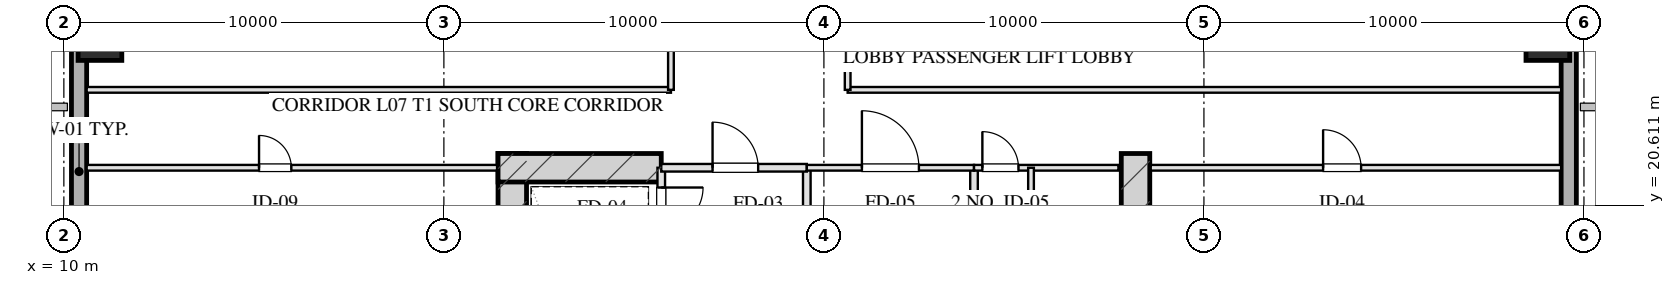
"""IFC4 building model, lengths in metres.
Left out: names, types, materials, properties, quantities, classifications, styles, units other than length and angle.
Written with IfcOpenShell. Run it as: python <this file> out.ifc"""

import sys

from ifc_helpers import new_model, si_unit, direction, frame, frame_2d, origin, origin_2d, place, context, subcontext, project, spatial, rectangle, hollow_rectangle, extrude, element, fill, save


model = new_model("IFC4")
c1 = context("Model", 3, precision=1e-05, world=origin(), true_north=direction((0.0, 1.0)))
c2 = subcontext(c1, "Body", "Model", "MODEL_VIEW")
j1 = project(units=[si_unit("LENGTHUNIT", "METRE"), si_unit("PLANEANGLEUNIT", "RADIAN")], contexts=[c1])
p1 = place(None, origin())
s1 = spatial("IfcSite", under=j1, at=p1, CompositionType="ELEMENT")
p2 = place(p1, origin())
s2 = spatial("IfcBuilding", under=s1, at=p2, CompositionType="ELEMENT")
p3 = place(p2, frame((0.0, 0.0, 34.0)))
s3 = spatial("IfcBuildingStorey", under=s2, at=p3, CompositionType="ELEMENT", Elevation=34.0)
for number, where, z_axis, x_axis in (
    (1, (21.8, 21.975, 0.0), (0.0, 0.0, 1.0), (0.0, -1.0, 0.0)),
    (2, (38.2, 21.975, 0.0), (0.0, 0.0, 1.0), (0.0, -1.0, 0.0)),
):
    element("IfcWall", number, at=place(p3, frame(where, z_axis=z_axis, x_axis=x_axis)), inside=s3, PredefinedType="SHEAR", context=c2, shape_type="SweptSolid", body=[
        extrude(rectangle(XDim=9.63, YDim=0.75, at=frame_2d((4.815, 0.0))), origin(), (0.0, 0.0, 1.0), 4.0),
    ])
p4 = place(p3, frame((21.425, 21.6, 0.0), z_axis=(0.0, 0.0, 1.0), x_axis=(1.0, 0.0, 0.0)))
e3 = element("IfcWall", 3, at=p4, inside=s3, PredefinedType="SHEAR", context=c2, shape_type="SweptSolid", body=[
    extrude(rectangle(XDim=4.295, YDim=0.75, at=frame_2d((2.147, 0.0))), origin(), (0.0, 0.0, 1.0), 4.0),
])
for number, where, z_axis, x_axis in (
    (4, (10.95, 25.0, 0.0), (0.0, 0.0, 1.0), (1.0, 0.0, 0.0)),
    (5, (49.05, 25.0, 0.0), (0.0, 0.0, 1.0), (1.0, 0.0, 0.0)),
):
    element("IfcColumn", number, at=place(p3, frame(where, z_axis=z_axis, x_axis=x_axis)), inside=s3, PredefinedType="COLUMN", context=c2, shape_type="SweptSolid", body=[
        extrude(hollow_rectangle(XDim=1.15, YDim=1.15, WallThickness=0.04, at=origin_2d()), origin(), (0.0, 0.0, 1.0), 4.001),
    ])
p5 = place(p3, frame((10.4, 7.2, 0.0), z_axis=(0.0, 0.0, 1.0), x_axis=(0.0, 1.0, 0.0)))
e6 = element("IfcWall", 6, at=p5, inside=s3, PredefinedType="SOLIDWALL", context=c2, shape_type="SweptSolid", body=[
    extrude(rectangle(XDim=53.6, YDim=0.4, at=frame_2d((26.8, 0.0))), origin(), (0.0, 0.0, 1.0), 3.16),
])
p6 = place(p5, frame((22.95, 0.0, 0.75)))
e7 = element("IfcOpeningElement", 7, at=p6, cuts=e6, PredefinedType="OPENING", context=c2, shape_type="SweptSolid", body=[
    extrude(rectangle(XDim=2.5, YDim=1.75, at=frame_2d((1.25, 0.875))), frame((0.0, 0.21, 0.0), z_axis=(0.0, -1.0, 0.0), x_axis=(1.0, 0.0, 0.0)), (0.0, 0.0, 1.0), 0.42),
])
p7 = place(p5, frame((29.35, 0.0, 0.0)))
e8 = element("IfcOpeningElement", 8, at=p7, cuts=e6, PredefinedType="OPENING", context=c2, shape_type="SweptSolid", body=[
    extrude(rectangle(XDim=1.1, YDim=2.15, at=frame_2d((0.55, 1.075))), frame((0.0, 0.21, 0.0), z_axis=(0.0, -1.0, 0.0), x_axis=(1.0, 0.0, 0.0)), (0.0, 0.0, 1.0), 0.42),
])
p8 = place(p3, frame((49.6, 60.8, 0.0), z_axis=(0.0, 0.0, 1.0), x_axis=(0.0, -1.0, 0.0)))
e9 = element("IfcWall", 9, at=p8, inside=s3, PredefinedType="SOLIDWALL", context=c2, shape_type="SweptSolid", body=[
    extrude(rectangle(XDim=53.6, YDim=0.4, at=frame_2d((26.8, 0.0))), origin(), (0.0, 0.0, 1.0), 3.16),
])
p9 = place(p8, frame((28.15, 0.0, 0.75)))
e10 = element("IfcOpeningElement", 10, at=p9, cuts=e9, PredefinedType="OPENING", context=c2, shape_type="SweptSolid", body=[
    extrude(rectangle(XDim=2.5, YDim=1.75, at=frame_2d((1.25, 0.875))), frame((0.0, 0.21, 0.0), z_axis=(0.0, -1.0, 0.0), x_axis=(1.0, 0.0, 0.0)), (0.0, 0.0, 1.0), 0.42),
])
p10 = place(p8, frame((23.15, 0.0, 0.0)))
e11 = element("IfcOpeningElement", 11, at=p10, cuts=e9, PredefinedType="OPENING", context=c2, shape_type="SweptSolid", body=[
    extrude(rectangle(XDim=1.1, YDim=2.15, at=frame_2d((0.55, 1.075))), frame((0.0, 0.21, 0.0), z_axis=(0.0, -1.0, 0.0), x_axis=(1.0, 0.0, 0.0)), (0.0, 0.0, 1.0), 0.42),
])
p11 = place(p3, frame((25.72, 21.6, 0.0), z_axis=(0.0, 0.0, 1.0), x_axis=(0.0, -1.0, 0.0)))
e12 = element("IfcWall", 12, at=p11, inside=s3, PredefinedType="PARTITIONING", context=c2, shape_type="SweptSolid", body=[
    extrude(rectangle(XDim=1.9, YDim=0.2, at=frame_2d((0.95, 0.0))), origin(), (0.0, 0.0, 1.0), 3.725),
])
p12 = place(p11, frame((0.52, 0.0, 0.0)))
e13 = element("IfcOpeningElement", 13, at=p12, cuts=e12, PredefinedType="OPENING", context=c2, shape_type="SweptSolid", body=[
    extrude(rectangle(XDim=1.1, YDim=2.05, at=frame_2d((0.55, 1.025))), frame((0.0, 0.11, 0.0), z_axis=(0.0, -1.0, 0.0), x_axis=(1.0, 0.0, 0.0)), (0.0, 0.0, 1.0), 0.22),
])
p13 = place(p3, frame((29.55, 21.6, 0.0), z_axis=(0.0, 0.0, 1.0), x_axis=(0.0, -1.0, 0.0)))
e14 = element("IfcWall", 14, at=p13, inside=s3, PredefinedType="PARTITIONING", context=c2, shape_type="SweptSolid", body=[
    extrude(rectangle(XDim=8.43, YDim=0.2, at=frame_2d((4.215, 0.0))), origin(), (0.0, 0.0, 1.0), 3.725),
])
p14 = place(p3, frame((25.72, 21.6, 0.0), z_axis=(0.0, 0.0, 1.0), x_axis=(1.0, 0.0, 0.0)))
e15 = element("IfcWall", 15, at=p14, inside=s3, PredefinedType="PARTITIONING", context=c2, shape_type="SweptSolid", body=[
    extrude(rectangle(XDim=3.83, YDim=0.2, at=frame_2d((1.915, 0.0))), origin(), (0.0, 0.0, 1.0), 3.725),
])
p15 = place(p14, frame((1.35, 0.0, 0.0)))
e16 = element("IfcOpeningElement", 16, at=p15, cuts=e15, PredefinedType="OPENING", context=c2, shape_type="SweptSolid", body=[
    extrude(rectangle(XDim=1.2, YDim=2.05, at=frame_2d((0.6, 1.025))), frame((0.0, 0.11, 0.0), z_axis=(0.0, -1.0, 0.0), x_axis=(1.0, 0.0, 0.0)), (0.0, 0.0, 1.0), 0.22),
])
p16 = place(p3, frame((33.95, 21.6, 0.0), z_axis=(0.0, 0.0, 1.0), x_axis=(0.0, -1.0, 0.0)))
e17 = element("IfcWall", 17, at=p16, inside=s3, PredefinedType="PARTITIONING", context=c2, shape_type="SweptSolid", body=[
    extrude(rectangle(XDim=8.43, YDim=0.2, at=frame_2d((4.215, 0.0))), origin(), (0.0, 0.0, 1.0), 3.725),
])
p17 = place(p3, frame((29.55, 21.6, 0.0), z_axis=(0.0, 0.0, 1.0), x_axis=(1.0, 0.0, 0.0)))
e18 = element("IfcWall", 18, at=p17, inside=s3, PredefinedType="PARTITIONING", context=c2, shape_type="SweptSolid", body=[
    extrude(rectangle(XDim=4.4, YDim=0.15, at=frame_2d((2.2, 0.0))), origin(), (0.0, 0.0, 1.0), 3.725),
])
p18 = place(p17, frame((1.45, 0.0, 0.0)))
e19 = element("IfcOpeningElement", 19, at=p18, cuts=e18, PredefinedType="OPENING", context=c2, shape_type="SweptSolid", body=[
    extrude(rectangle(XDim=1.5, YDim=2.05, at=frame_2d((0.75, 1.025))), frame((0.0, 0.085, 0.0), z_axis=(0.0, -1.0, 0.0), x_axis=(1.0, 0.0, 0.0)), (0.0, 0.0, 1.0), 0.17),
])
p19 = place(p3, frame((33.95, 21.6, 0.0), z_axis=(0.0, 0.0, 1.0), x_axis=(1.0, 0.0, 0.0)))
e20 = element("IfcWall", 20, at=p19, inside=s3, PredefinedType="PARTITIONING", context=c2, shape_type="SweptSolid", body=[
    extrude(rectangle(XDim=3.8, YDim=0.15, at=frame_2d((1.9, 0.0))), origin(), (0.0, 0.0, 1.0), 3.725),
])
p20 = place(p19, frame((0.22, 0.0, 0.0)))
e21 = element("IfcOpeningElement", 21, at=p20, cuts=e20, PredefinedType="OPENING", context=c2, shape_type="SweptSolid", body=[
    extrude(rectangle(XDim=0.95, YDim=2.05, at=frame_2d((0.475, 1.025))), frame((0.0, 0.085, 0.0), z_axis=(0.0, -1.0, 0.0), x_axis=(1.0, 0.0, 0.0)), (0.0, 0.0, 1.0), 0.17),
])
p21 = place(p3, frame((35.45, 21.6, 0.0), z_axis=(0.0, 0.0, 1.0), x_axis=(0.0, -1.0, 0.0)))
e22 = element("IfcWall", 22, at=p21, inside=s3, PredefinedType="PARTITIONING", context=c2, shape_type="SweptSolid", body=[
    extrude(rectangle(XDim=8.43, YDim=0.15, at=frame_2d((4.215, 0.0))), origin(), (0.0, 0.0, 1.0), 3.365),
])
p22 = place(p21, frame((2.55, 0.0, 0.0)))
e23 = element("IfcOpeningElement", 23, at=p22, cuts=e22, PredefinedType="OPENING", context=c2, shape_type="SweptSolid", body=[
    extrude(rectangle(XDim=0.95, YDim=2.05, at=frame_2d((0.475, 1.025))), frame((0.0, 0.085, 0.0), z_axis=(0.0, -1.0, 0.0), x_axis=(1.0, 0.0, 0.0)), (0.0, 0.0, 1.0), 0.17),
])
p23 = place(p21, frame((4.7, 0.0, 0.0)))
e24 = element("IfcOpeningElement", 24, at=p23, cuts=e22, PredefinedType="OPENING", context=c2, shape_type="SweptSolid", body=[
    extrude(rectangle(XDim=0.9, YDim=2.05, at=frame_2d((0.45, 1.025))), frame((0.0, 0.085, 0.0), z_axis=(0.0, -1.0, 0.0), x_axis=(1.0, 0.0, 0.0)), (0.0, 0.0, 1.0), 0.17),
])
p24 = place(p21, frame((6.8, 0.0, 0.0)))
e25 = element("IfcOpeningElement", 25, at=p24, cuts=e22, PredefinedType="OPENING", context=c2, shape_type="SweptSolid", body=[
    extrude(rectangle(XDim=0.9, YDim=2.05, at=frame_2d((0.45, 1.025))), frame((0.0, 0.085, 0.0), z_axis=(0.0, -1.0, 0.0), x_axis=(1.0, 0.0, 0.0)), (0.0, 0.0, 1.0), 0.17),
])
p25 = place(p3, frame((10.6, 21.6, 0.0), z_axis=(0.0, 0.0, 1.0), x_axis=(1.0, 0.0, 0.0)))
e26 = element("IfcWall", 26, at=p25, inside=s3, PredefinedType="PARTITIONING", context=c2, shape_type="SweptSolid", body=[
    extrude(rectangle(XDim=10.8, YDim=0.15, at=frame_2d((5.4, 0.0))), origin(), (0.0, 0.0, 1.0), 3.725),
])
p26 = place(p25, frame((4.536, 0.0, 0.0)))
e27 = element("IfcOpeningElement", 27, at=p26, cuts=e26, PredefinedType="OPENING", context=c2, shape_type="SweptSolid", body=[
    extrude(rectangle(XDim=0.85, YDim=2.05, at=frame_2d((0.425, 1.025))), frame((0.0, 0.085, 0.0), z_axis=(0.0, -1.0, 0.0), x_axis=(1.0, 0.0, 0.0)), (0.0, 0.0, 1.0), 0.17),
])
p27 = place(p3, frame((38.6, 21.6, 0.0), z_axis=(0.0, 0.0, 1.0), x_axis=(1.0, 0.0, 0.0)))
e28 = element("IfcWall", 28, at=p27, inside=s3, PredefinedType="PARTITIONING", context=c2, shape_type="SweptSolid", body=[
    extrude(rectangle(XDim=10.8, YDim=0.15, at=frame_2d((5.4, 0.0))), origin(), (0.0, 0.0, 1.0), 3.725),
])
p28 = place(p27, frame((4.536, 0.0, 0.0)))
e29 = element("IfcOpeningElement", 29, at=p28, cuts=e28, PredefinedType="OPENING", context=c2, shape_type="SweptSolid", body=[
    extrude(rectangle(XDim=1.0, YDim=2.05, at=frame_2d((0.5, 1.025))), frame((0.0, 0.085, 0.0), z_axis=(0.0, -1.0, 0.0), x_axis=(1.0, 0.0, 0.0)), (0.0, 0.0, 1.0), 0.17),
])
p29 = place(p3, frame((10.6, 23.65, 0.0), z_axis=(0.0, 0.0, 1.0), x_axis=(1.0, 0.0, 0.0)))
e30 = element("IfcWall", 30, at=p29, inside=s3, PredefinedType="PARTITIONING", context=c2, shape_type="SweptSolid", body=[
    extrude(rectangle(XDim=15.375, YDim=0.15, at=frame_2d((7.688, 0.0))), origin(), (0.0, 0.0, 1.0), 3.725),
])
p30 = place(p3, frame((30.625, 23.65, 0.0), z_axis=(0.0, 0.0, 1.0), x_axis=(1.0, 0.0, 0.0)))
e31 = element("IfcWall", 31, at=p30, inside=s3, PredefinedType="PARTITIONING", context=c2, shape_type="SweptSolid", body=[
    extrude(rectangle(XDim=18.775, YDim=0.15, at=frame_2d((9.387, 0.0))), origin(), (0.0, 0.0, 1.0), 3.725),
])
p31 = place(p3, frame((25.975, 23.65, 0.0), z_axis=(0.0, 0.0, 1.0), x_axis=(0.0, 1.0, 0.0)))
e32 = element("IfcWall", 32, at=p31, inside=s3, PredefinedType="PARTITIONING", context=c2, shape_type="SweptSolid", body=[
    extrude(rectangle(XDim=20.7, YDim=0.15, at=frame_2d((10.35, 0.0))), origin(), (0.0, 0.0, 1.0), 3.725),
])
p32 = place(p31, frame((2.175, 0.0, 0.0)))
e33 = element("IfcOpeningElement", 33, at=p32, cuts=e32, PredefinedType="OPENING", context=c2, shape_type="SweptSolid", body=[
    extrude(rectangle(XDim=1.0, YDim=2.05, at=frame_2d((0.5, 1.025))), frame((0.0, 0.085, 0.0), z_axis=(0.0, -1.0, 0.0), x_axis=(1.0, 0.0, 0.0)), (0.0, 0.0, 1.0), 0.17),
])
p33 = place(p31, frame((7.69, 0.0, 0.0)))
e34 = element("IfcOpeningElement", 34, at=p33, cuts=e32, PredefinedType="OPENING", context=c2, shape_type="SweptSolid", body=[
    extrude(rectangle(XDim=1.05, YDim=2.05, at=frame_2d((0.525, 1.025))), frame((0.0, 0.085, 0.0), z_axis=(0.0, -1.0, 0.0), x_axis=(1.0, 0.0, 0.0)), (0.0, 0.0, 1.0), 0.17),
])
p34 = place(p31, frame((12.69, 0.0, 0.0)))
e35 = element("IfcOpeningElement", 35, at=p34, cuts=e32, PredefinedType="OPENING", context=c2, shape_type="SweptSolid", body=[
    extrude(rectangle(XDim=1.0, YDim=2.05, at=frame_2d((0.5, 1.025))), frame((0.0, 0.085, 0.0), z_axis=(0.0, -1.0, 0.0), x_axis=(1.0, 0.0, 0.0)), (0.0, 0.0, 1.0), 0.17),
])
p35 = place(p31, frame((17.525, 0.0, 0.0)))
e36 = element("IfcOpeningElement", 36, at=p35, cuts=e32, PredefinedType="OPENING", context=c2, shape_type="SweptSolid", body=[
    extrude(rectangle(XDim=1.0, YDim=2.05, at=frame_2d((0.5, 1.025))), frame((0.0, 0.085, 0.0), z_axis=(0.0, -1.0, 0.0), x_axis=(1.0, 0.0, 0.0)), (0.0, 0.0, 1.0), 0.17),
])
p36 = place(p3, frame((30.625, 23.65, 0.0), z_axis=(0.0, 0.0, 1.0), x_axis=(0.0, 1.0, 0.0)))
e37 = element("IfcWall", 37, at=p36, inside=s3, PredefinedType="PARTITIONING", context=c2, shape_type="SweptSolid", body=[
    extrude(rectangle(XDim=20.7, YDim=0.15, at=frame_2d((10.35, 0.0))), origin(), (0.0, 0.0, 1.0), 3.725),
])
p37 = place(p36, frame((2.191, 0.0, 0.0)))
e38 = element("IfcOpeningElement", 38, at=p37, cuts=e37, PredefinedType="OPENING", context=c2, shape_type="SweptSolid", body=[
    extrude(rectangle(XDim=1.0, YDim=2.05, at=frame_2d((0.5, 1.025))), frame((0.0, 0.085, 0.0), z_axis=(0.0, -1.0, 0.0), x_axis=(1.0, 0.0, 0.0)), (0.0, 0.0, 1.0), 0.17),
])
p38 = place(p36, frame((7.78, 0.0, 0.0)))
e39 = element("IfcOpeningElement", 39, at=p38, cuts=e37, PredefinedType="OPENING", context=c2, shape_type="SweptSolid", body=[
    extrude(rectangle(XDim=1.0, YDim=2.05, at=frame_2d((0.5, 1.025))), frame((0.0, 0.085, 0.0), z_axis=(0.0, -1.0, 0.0), x_axis=(1.0, 0.0, 0.0)), (0.0, 0.0, 1.0), 0.17),
])
p39 = place(p36, frame((12.764, 0.0, 0.0)))
e40 = element("IfcOpeningElement", 40, at=p39, cuts=e37, PredefinedType="OPENING", context=c2, shape_type="SweptSolid", body=[
    extrude(rectangle(XDim=1.0, YDim=2.05, at=frame_2d((0.5, 1.025))), frame((0.0, 0.085, 0.0), z_axis=(0.0, -1.0, 0.0), x_axis=(1.0, 0.0, 0.0)), (0.0, 0.0, 1.0), 0.17),
])
p40 = place(p36, frame((17.525, 0.0, 0.0)))
e41 = element("IfcOpeningElement", 41, at=p40, cuts=e37, PredefinedType="OPENING", context=c2, shape_type="SweptSolid", body=[
    extrude(rectangle(XDim=0.85, YDim=2.05, at=frame_2d((0.425, 1.025))), frame((0.0, 0.085, 0.0), z_axis=(0.0, -1.0, 0.0), x_axis=(1.0, 0.0, 0.0)), (0.0, 0.0, 1.0), 0.17),
])
p41 = place(p12, origin())
e42 = element("IfcDoor", 42, at=p41, inside=s3, OperationType="SINGLE_SWING_LEFT", PredefinedType="DOOR", context=c2, shape_type="SweptSolid", body=[
    extrude(rectangle(XDim=1.1, YDim=2.05, at=frame_2d((0.55, 1.025))), frame((0.0, 0.025, 0.0), z_axis=(0.0, -1.0, 0.0), x_axis=(1.0, 0.0, 0.0)), (0.0, 0.0, 1.0), 0.05),
])
fill(e13, e42)
p42 = place(p15, origin())
e43 = element("IfcDoor", 43, at=p42, inside=s3, OperationType="SINGLE_SWING_LEFT", PredefinedType="DOOR", context=c2, shape_type="SweptSolid", body=[
    extrude(rectangle(XDim=1.2, YDim=2.05, at=frame_2d((0.6, 1.025))), frame((0.0, 0.025, 0.0), z_axis=(0.0, -1.0, 0.0), x_axis=(1.0, 0.0, 0.0)), (0.0, 0.0, 1.0), 0.05),
])
fill(e16, e43)
p43 = place(p18, origin())
e44 = element("IfcDoor", 44, at=p43, inside=s3, OperationType="SINGLE_SWING_LEFT", PredefinedType="DOOR", context=c2, shape_type="SweptSolid", body=[
    extrude(rectangle(XDim=1.5, YDim=2.05, at=frame_2d((0.75, 1.025))), frame((0.0, 0.025, 0.0), z_axis=(0.0, -1.0, 0.0), x_axis=(1.0, 0.0, 0.0)), (0.0, 0.0, 1.0), 0.05),
])
fill(e19, e44)
p44 = place(p20, origin())
e45 = element("IfcDoor", 45, at=p44, inside=s3, OperationType="SINGLE_SWING_LEFT", PredefinedType="DOOR", context=c2, shape_type="SweptSolid", body=[
    extrude(rectangle(XDim=0.95, YDim=2.05, at=frame_2d((0.475, 1.025))), frame((0.0, 0.025, 0.0), z_axis=(0.0, -1.0, 0.0), x_axis=(1.0, 0.0, 0.0)), (0.0, 0.0, 1.0), 0.05),
])
fill(e21, e45)
p45 = place(p26, origin())
e46 = element("IfcDoor", 46, at=p45, inside=s3, OperationType="SINGLE_SWING_LEFT", PredefinedType="DOOR", context=c2, shape_type="SweptSolid", body=[
    extrude(rectangle(XDim=0.85, YDim=2.05, at=frame_2d((0.425, 1.025))), frame((0.0, 0.025, 0.0), z_axis=(0.0, -1.0, 0.0), x_axis=(1.0, 0.0, 0.0)), (0.0, 0.0, 1.0), 0.05),
])
fill(e27, e46)
p46 = place(p28, origin())
e47 = element("IfcDoor", 47, at=p46, inside=s3, OperationType="SINGLE_SWING_LEFT", PredefinedType="DOOR", context=c2, shape_type="SweptSolid", body=[
    extrude(rectangle(XDim=1.0, YDim=2.05, at=frame_2d((0.5, 1.025))), frame((0.0, 0.025, 0.0), z_axis=(0.0, -1.0, 0.0), x_axis=(1.0, 0.0, 0.0)), (0.0, 0.0, 1.0), 0.05),
])
fill(e29, e47)
save(model, sys.argv[1])
